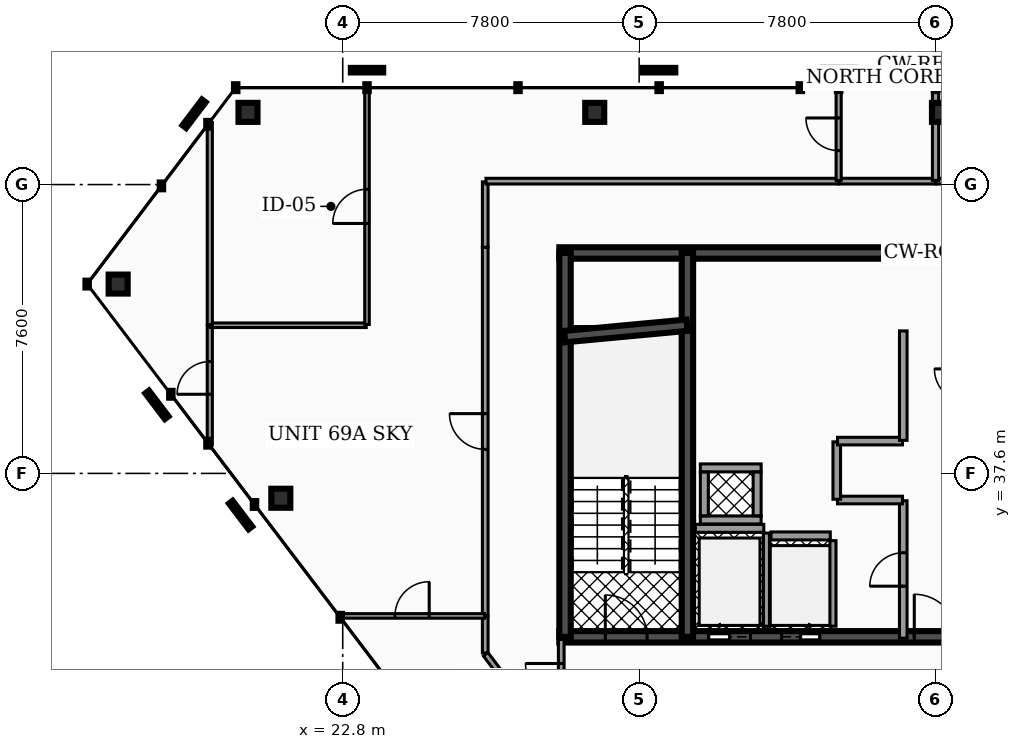
"""IFC4 building model, lengths in metres.
Left out: names, types, materials, properties, quantities, classifications, styles, units other than length and angle.
Written with IfcOpenShell. Run it as: python <this file> out.ifc"""

import sys

from ifc_helpers import new_model, si_unit, direction, frame, frame_2d, origin, origin_2d, place, context, subcontext, project, spatial, rectangle, hollow_rectangle, extrude, element, fill, save


model = new_model("IFC4")
c1 = context("Model", 3, precision=1e-05, world=origin(), true_north=direction((0.0, 1.0)))
c2 = subcontext(c1, "Body", "Model", "MODEL_VIEW")
j1 = project(units=[si_unit("LENGTHUNIT", "METRE"), si_unit("PLANEANGLEUNIT", "RADIAN")], contexts=[c1])
p1 = place(None, origin())
s1 = spatial("IfcSite", under=j1, at=p1, CompositionType="ELEMENT")
p2 = place(p1, origin())
s2 = spatial("IfcBuilding", under=s1, at=p2, CompositionType="ELEMENT")
p3 = place(p2, frame((0.0, 0.0, 272.0)))
s3 = spatial("IfcBuildingStorey", under=s2, at=p3, CompositionType="ELEMENT", Elevation=272.0)
p4 = place(p3, frame((28.5, 43.4, 0.0), z_axis=(0.0, 0.0, 1.0), x_axis=(1.0, 0.0, 0.0)))
e1 = element("IfcWall", 1, at=p4, inside=s3, PredefinedType="SHEAR", context=c2, shape_type="SweptSolid", body=[
    extrude(rectangle(XDim=19.86, YDim=0.3, at=frame_2d((9.93, 0.0))), origin(), (0.0, 0.0, 1.0), 3.18),
])
p5 = place(p3, frame((28.5, 33.3, 0.0), z_axis=(0.0, 0.0, 1.0), x_axis=(1.0, 0.0, 0.0)))
e2 = element("IfcWall", 2, at=p5, inside=s3, PredefinedType="SHEAR", context=c2, shape_type="SweptSolid", body=[
    extrude(rectangle(XDim=19.86, YDim=0.3, at=frame_2d((9.93, 0.0))), origin(), (0.0, 0.0, 1.0), 3.18),
])
p6 = place(p5, frame((3.93, 0.0, 0.0)))
e3 = element("IfcOpeningElement", 3, at=p6, cuts=e2, PredefinedType="OPENING", context=c2, shape_type="SweptSolid", body=[
    extrude(rectangle(XDim=1.1, YDim=2.15, at=frame_2d((0.55, 1.075))), frame((0.0, 0.16, 0.0), z_axis=(0.0, -1.0, 0.0), x_axis=(1.0, 0.0, 0.0)), (0.0, 0.0, 1.0), 0.32),
])
p7 = place(p5, frame((14.77, 0.0, 0.0)))
e4 = element("IfcOpeningElement", 4, at=p7, cuts=e2, PredefinedType="OPENING", context=c2, shape_type="SweptSolid", body=[
    extrude(rectangle(XDim=1.1, YDim=2.15, at=frame_2d((0.55, 1.075))), frame((0.0, 0.16, 0.0), z_axis=(0.0, -1.0, 0.0), x_axis=(1.0, 0.0, 0.0)), (0.0, 0.0, 1.0), 0.32),
])
p8 = place(p5, frame((11.25, 0.0, 0.0)))
e5 = element("IfcOpeningElement", 5, at=p8, cuts=e2, PredefinedType="OPENING", context=c2, shape_type="SweptSolid", body=[
    extrude(rectangle(XDim=1.0, YDim=2.1, at=frame_2d((0.5, 1.05))), frame((0.0, 0.16, 0.0), z_axis=(0.0, -1.0, 0.0), x_axis=(1.0, 0.0, 0.0)), (0.0, 0.0, 1.0), 0.32),
])
p9 = place(p5, frame((12.95, 0.0, 0.0)))
e6 = element("IfcOpeningElement", 6, at=p9, cuts=e2, PredefinedType="OPENING", context=c2, shape_type="SweptSolid", body=[
    extrude(rectangle(XDim=1.0, YDim=2.1, at=frame_2d((0.5, 1.05))), frame((0.0, 0.16, 0.0), z_axis=(0.0, -1.0, 0.0), x_axis=(1.0, 0.0, 0.0)), (0.0, 0.0, 1.0), 0.32),
])
p10 = place(p5, frame((5.85, 0.0, 0.0)))
e7 = element("IfcOpeningElement", 7, at=p10, cuts=e2, PredefinedType="OPENING", context=c2, shape_type="SweptSolid", body=[
    extrude(rectangle(XDim=1.0, YDim=2.1, at=frame_2d((0.5, 1.05))), frame((0.0, 0.16, 0.0), z_axis=(0.0, -1.0, 0.0), x_axis=(1.0, 0.0, 0.0)), (0.0, 0.0, 1.0), 0.32),
])
p11 = place(p5, frame((1.21, 0.0, 0.0)))
e8 = element("IfcOpeningElement", 8, at=p11, cuts=e2, PredefinedType="OPENING", context=c2, shape_type="SweptSolid", body=[
    extrude(rectangle(XDim=1.1, YDim=2.2, at=frame_2d((0.55, 1.1))), frame((0.0, 0.16, 0.0), z_axis=(0.0, -1.0, 0.0), x_axis=(1.0, 0.0, 0.0)), (0.0, 0.0, 1.0), 0.32),
])
p12 = place(p5, frame((9.34, 0.0, 0.0)))
e9 = element("IfcOpeningElement", 9, at=p12, cuts=e2, PredefinedType="OPENING", context=c2, shape_type="SweptSolid", body=[
    extrude(rectangle(XDim=1.12, YDim=2.05, at=frame_2d((0.56, 1.025))), frame((0.0, 0.16, 0.0), z_axis=(0.0, -1.0, 0.0), x_axis=(1.0, 0.0, 0.0)), (0.0, 0.0, 1.0), 0.32),
])
p13 = place(p5, frame((17.55, 0.0, 0.0)))
e10 = element("IfcOpeningElement", 10, at=p13, cuts=e2, PredefinedType="OPENING", context=c2, shape_type="SweptSolid", body=[
    extrude(rectangle(XDim=1.1, YDim=2.2, at=frame_2d((0.55, 1.1))), frame((0.0, 0.16, 0.0), z_axis=(0.0, -1.0, 0.0), x_axis=(1.0, 0.0, 0.0)), (0.0, 0.0, 1.0), 0.32),
])
for number, where, z_axis, x_axis in (
    (11, (28.65, 33.3, 0.0), (0.0, 0.0, 1.0), (0.0, 1.0, 0.0)),
    (12, (31.87, 33.3, 0.0), (0.0, 0.0, 1.0), (0.0, 1.0, 0.0)),
):
    element("IfcWall", number, at=place(p3, frame(where, z_axis=z_axis, x_axis=x_axis)), inside=s3, PredefinedType="SHEAR", context=c2, shape_type="SweptSolid", body=[
        extrude(rectangle(XDim=10.1, YDim=0.3, at=frame_2d((5.05, 0.0))), origin(), (0.0, 0.0, 1.0), 3.18),
    ])
p14 = place(p3, frame((28.64, 41.2, 0.0), z_axis=(0.0, 0.0, 1.0), x_axis=(0.995687118776, 0.092774789157, 0.0)))
e13 = element("IfcWall", 13, at=p14, inside=s3, PredefinedType="SHEAR", context=c2, shape_type="SweptSolid", body=[
    extrude(rectangle(XDim=3.234, YDim=0.3, at=frame_2d((1.617, 0.0))), origin(), (0.0, 0.0, 1.0), 3.18),
])
for number, where, z_axis, x_axis in (
    (14, (38.555, 47.1, 0.0), (0.0, 0.0, 1.0), (1.0, 0.0, 0.0)),
    (15, (29.431, 47.1, 0.0), (0.0, 0.0, 1.0), (1.0, 0.0, 0.0)),
    (16, (20.307, 47.1, 0.0), (0.0, 0.0, 1.0), (1.0, 0.0, 0.0)),
    (17, (16.891, 42.582, 0.0), (0.0, 0.0, 1.0), (1.0, 0.0, 0.0)),
    (18, (21.171, 36.946, 0.0), (0.0, 0.0, 1.0), (1.0, 0.0, 0.0)),
):
    element("IfcColumn", number, at=place(p3, frame(where, z_axis=z_axis, x_axis=x_axis)), inside=s3, PredefinedType="COLUMN", context=c2, shape_type="SweptSolid", body=[
        extrude(hollow_rectangle(XDim=0.5, YDim=0.5, WallThickness=0.025, at=origin_2d()), origin(), (0.0, 0.0, 1.0), 3.18),
    ])
p15 = place(p3, frame((32.08, 36.155, 0.0), z_axis=(0.0, 0.0, 1.0), x_axis=(1.0, 0.0, 0.0)))
e19 = element("IfcWall", 19, at=p15, inside=s3, PredefinedType="SOLIDWALL", context=c2, shape_type="SweptSolid", body=[
    extrude(rectangle(XDim=1.8, YDim=0.21, at=frame_2d((0.9, 0.0))), origin(), (0.0, 0.0, 1.0), 3.18),
])
p16 = place(p3, frame((33.95, 33.58, 0.0), z_axis=(0.0, 0.0, 1.0), x_axis=(0.0, 1.0, 0.0)))
e20 = element("IfcWall", 20, at=p16, inside=s3, PredefinedType="SOLIDWALL", context=c2, shape_type="SweptSolid", body=[
    extrude(rectangle(XDim=2.45, YDim=0.16, at=frame_2d((1.225, 0.0))), origin(), (0.0, 0.0, 1.0), 3.18),
])
p17 = place(p3, frame((34.07, 35.955, 0.0), z_axis=(0.0, 0.0, 1.0), x_axis=(1.0, 0.0, 0.0)))
e21 = element("IfcWall", 21, at=p17, inside=s3, PredefinedType="SOLIDWALL", context=c2, shape_type="SweptSolid", body=[
    extrude(rectangle(XDim=1.56, YDim=0.21, at=frame_2d((0.78, 0.0))), origin(), (0.0, 0.0, 1.0), 3.18),
])
p18 = place(p3, frame((35.7, 33.58, 0.0), z_axis=(0.0, 0.0, 1.0), x_axis=(0.0, 1.0, 0.0)))
e22 = element("IfcWall", 22, at=p18, inside=s3, PredefinedType="SOLIDWALL", context=c2, shape_type="SweptSolid", body=[
    extrude(rectangle(XDim=2.25, YDim=0.16, at=frame_2d((1.125, 0.0))), origin(), (0.0, 0.0, 1.0), 3.18),
])
for number, where, z_axis, x_axis in (
    (23, (32.21, 36.375, 0.0), (0.0, 0.0, 1.0), (1.0, 0.0, 0.0)),
    (24, (32.21, 37.745, 0.0), (0.0, 0.0, 1.0), (1.0, 0.0, 0.0)),
):
    element("IfcWall", number, at=place(p3, frame(where, z_axis=z_axis, x_axis=x_axis)), inside=s3, PredefinedType="SOLIDWALL", context=c2, shape_type="SweptSolid", body=[
        extrude(rectangle(XDim=1.6, YDim=0.21, at=frame_2d((0.8, 0.0))), origin(), (0.0, 0.0, 1.0), 3.18),
    ])
for number, where, z_axis, x_axis in (
    (25, (32.315, 36.485, 0.0), (0.0, 0.0, 1.0), (0.0, 1.0, 0.0)),
    (26, (33.705, 36.485, 0.0), (0.0, 0.0, 1.0), (0.0, 1.0, 0.0)),
):
    element("IfcWall", number, at=place(p3, frame(where, z_axis=z_axis, x_axis=x_axis)), inside=s3, PredefinedType="SOLIDWALL", context=c2, shape_type="SweptSolid", body=[
        extrude(rectangle(XDim=1.15, YDim=0.21, at=frame_2d((0.575, 0.0))), origin(), (0.0, 0.0, 1.0), 3.18),
    ])
p19 = place(p3, frame((37.55, 33.265, 0.0), z_axis=(0.0, 0.0, 1.0), x_axis=(0.0, 1.0, 0.0)))
e27 = element("IfcWall", 27, at=p19, inside=s3, PredefinedType="PARTITIONING", context=c2, shape_type="SweptSolid", body=[
    extrude(rectangle(XDim=3.615, YDim=0.2, at=frame_2d((1.808, 0.0))), origin(), (0.0, 0.0, 1.0), 2.235),
])
p20 = place(p19, frame((1.367, 0.0, 0.0)))
e28 = element("IfcOpeningElement", 28, at=p20, cuts=e27, PredefinedType="OPENING", context=c2, shape_type="SweptSolid", body=[
    extrude(rectangle(XDim=0.88, YDim=2.05, at=frame_2d((0.44, 1.025))), frame((0.0, 0.11, 0.0), z_axis=(0.0, -1.0, 0.0), x_axis=(1.0, 0.0, 0.0)), (0.0, 0.0, 1.0), 0.22),
])
p21 = place(p3, frame((35.82, 36.9, 0.0), z_axis=(0.0, 0.0, 1.0), x_axis=(1.0, 0.0, 0.0)))
e29 = element("IfcWall", 29, at=p21, inside=s3, PredefinedType="PARTITIONING", context=c2, shape_type="SweptSolid", body=[
    extrude(rectangle(XDim=1.71, YDim=0.2, at=frame_2d((0.855, 0.0))), origin(), (0.0, 0.0, 1.0), 2.235),
])
p22 = place(p3, frame((35.8, 36.92, 0.0), z_axis=(0.0, 0.0, 1.0), x_axis=(0.0, 1.0, 0.0)))
e30 = element("IfcWall", 30, at=p22, inside=s3, PredefinedType="PARTITIONING", context=c2, shape_type="SweptSolid", body=[
    extrude(rectangle(XDim=1.51, YDim=0.2, at=frame_2d((0.755, 0.0))), origin(), (0.0, 0.0, 1.0), 2.235),
])
p23 = place(p3, frame((35.82, 38.45, 0.0), z_axis=(0.0, 0.0, 1.0), x_axis=(1.0, 0.0, 0.0)))
e31 = element("IfcWall", 31, at=p23, inside=s3, PredefinedType="PARTITIONING", context=c2, shape_type="SweptSolid", body=[
    extrude(rectangle(XDim=1.71, YDim=0.2, at=frame_2d((0.855, 0.0))), origin(), (0.0, 0.0, 1.0), 2.235),
])
p24 = place(p3, frame((37.55, 38.47, 0.0), z_axis=(0.0, 0.0, 1.0), x_axis=(0.0, 1.0, 0.0)))
e32 = element("IfcWall", 32, at=p24, inside=s3, PredefinedType="PARTITIONING", context=c2, shape_type="SweptSolid", body=[
    extrude(rectangle(XDim=2.88, YDim=0.2, at=frame_2d((1.44, 0.0))), origin(), (0.0, 0.0, 1.0), 2.235),
])
p25 = place(p3, frame((28.55, 30.227, 0.0), z_axis=(0.0, 0.0, 1.0), x_axis=(0.0, 1.0, 0.0)))
e33 = element("IfcWall", 33, at=p25, inside=s3, PredefinedType="PARTITIONING", context=c2, shape_type="SweptSolid", body=[
    extrude(rectangle(XDim=3.003, YDim=0.15, at=frame_2d((1.501, 0.0))), origin(), (0.0, 0.0, 1.0), 2.235),
])
p26 = place(p25, frame((1.431, 0.0, 0.0)))
e34 = element("IfcOpeningElement", 34, at=p26, cuts=e33, PredefinedType="OPENING", context=c2, shape_type="SweptSolid", body=[
    extrude(rectangle(XDim=0.94, YDim=2.05, at=frame_2d((0.47, 1.025))), frame((0.0, 0.085, 0.0), z_axis=(0.0, -1.0, 0.0), x_axis=(1.0, 0.0, 0.0)), (0.0, 0.0, 1.0), 0.17),
])
p27 = place(p3, frame((26.55, 33.855, 0.0), z_axis=(0.0, 0.0, 1.0), x_axis=(0.0, 1.0, 0.0)))
e35 = element("IfcWall", 35, at=p27, inside=s3, PredefinedType="PARTITIONING", context=c2, shape_type="SweptSolid", body=[
    extrude(rectangle(XDim=9.695, YDim=0.15, at=frame_2d((4.847, 0.0))), origin(), (0.0, 0.0, 1.0), 2.235),
])
p28 = place(p27, frame((4.377, 0.0, 0.0)))
e36 = element("IfcOpeningElement", 36, at=p28, cuts=e35, PredefinedType="OPENING", context=c2, shape_type="SweptSolid", body=[
    extrude(rectangle(XDim=0.94, YDim=2.05, at=frame_2d((0.47, 1.025))), frame((0.0, 0.085, 0.0), z_axis=(0.0, -1.0, 0.0), x_axis=(1.0, 0.0, 0.0)), (0.0, 0.0, 1.0), 0.17),
])
p29 = place(p3, frame((26.55, 43.55, 0.0), z_axis=(0.0, 0.0, 1.0), x_axis=(0.0, 1.0, 0.0)))
e37 = element("IfcWall", 37, at=p29, inside=s3, PredefinedType="PARTITIONING", context=c2, shape_type="SweptSolid", body=[
    extrude(rectangle(XDim=1.72, YDim=0.15, at=frame_2d((0.86, 0.0))), origin(), (0.0, 0.0, 1.0), 2.235),
])
p30 = place(p3, frame((26.57, 45.29, 0.0), z_axis=(0.0, 0.0, 1.0), x_axis=(1.0, 0.0, 0.0)))
e38 = element("IfcWall", 38, at=p30, inside=s3, PredefinedType="PARTITIONING", context=c2, shape_type="SweptSolid", body=[
    extrude(rectangle(XDim=9.275, YDim=0.15, at=frame_2d((4.637, 0.0))), origin(), (0.0, 0.0, 1.0), 2.235),
])
p31 = place(p3, frame((35.855, 45.29, 0.0), z_axis=(0.0, 0.0, 1.0), x_axis=(1.0, 0.0, 0.0)))
e39 = element("IfcWall", 39, at=p31, inside=s3, PredefinedType="PARTITIONING", context=c2, shape_type="SweptSolid", body=[
    extrude(rectangle(XDim=2.54, YDim=0.15, at=frame_2d((1.27, 0.0))), origin(), (0.0, 0.0, 1.0), 2.235),
])
p32 = place(p3, frame((26.562, 32.84, 0.0), z_axis=(0.0, 0.0, 1.0), x_axis=(0.604783852999, -0.796389660375, 0.0)))
e40 = element("IfcWall", 40, at=p32, inside=s3, PredefinedType="PARTITIONING", context=c2, shape_type="SweptSolid", body=[
    extrude(rectangle(XDim=3.267, YDim=0.15, at=frame_2d((1.634, 0.0))), origin(), (0.0, 0.0, 1.0), 2.235),
])
p33 = place(p3, frame((26.55, 32.875, 0.0), z_axis=(0.0, 0.0, 1.0), x_axis=(0.0, 1.0, 0.0)))
e41 = element("IfcWall", 41, at=p33, inside=s3, PredefinedType="PARTITIONING", context=c2, shape_type="SweptSolid", body=[
    extrude(rectangle(XDim=0.97, YDim=0.15, at=frame_2d((0.485, 0.0))), origin(), (0.0, 0.0, 1.0), 2.235),
])
p34 = place(p3, frame((38.405, 45.29, 0.0), z_axis=(0.0, 0.0, 1.0), x_axis=(1.0, 0.0, 0.0)))
e42 = element("IfcWall", 42, at=p34, inside=s3, PredefinedType="PARTITIONING", context=c2, shape_type="SweptSolid", body=[
    extrude(rectangle(XDim=2.54, YDim=0.15, at=frame_2d((1.27, 0.0))), origin(), (0.0, 0.0, 1.0), 2.235),
])
p35 = place(p3, frame((19.302, 38.347, 0.0), z_axis=(0.0, 0.0, 1.0), x_axis=(0.0, 1.0, 0.0)))
e43 = element("IfcWall", 43, at=p35, inside=s3, PredefinedType="PARTITIONING", context=c2, shape_type="SweptSolid", body=[
    extrude(rectangle(XDim=3.132, YDim=0.135, at=frame_2d((1.566, 0.0))), origin(), (0.0, 0.0, 1.0), 2.235),
])
p36 = place(p35, frame((1.336, 0.0, 0.0)))
e44 = element("IfcOpeningElement", 44, at=p36, cuts=e43, PredefinedType="OPENING", context=c2, shape_type="SweptSolid", body=[
    extrude(rectangle(XDim=0.86, YDim=2.05, at=frame_2d((0.43, 1.025))), frame((0.0, 0.077, 0.0), z_axis=(0.0, -1.0, 0.0), x_axis=(1.0, 0.0, 0.0)), (0.0, 0.0, 1.0), 0.155),
])
p37 = place(p3, frame((35.85, 45.31, 0.0), z_axis=(0.0, 0.0, 1.0), x_axis=(0.0, 1.0, 0.0)))
e45 = element("IfcWall", 45, at=p37, inside=s3, PredefinedType="PARTITIONING", context=c2, shape_type="SweptSolid", body=[
    extrude(rectangle(XDim=2.425, YDim=0.135, at=frame_2d((1.212, 0.0))), origin(), (0.0, 0.0, 1.0), 2.235),
])
p38 = place(p37, frame((0.782, 0.0, 0.0)))
e46 = element("IfcOpeningElement", 46, at=p38, cuts=e45, PredefinedType="OPENING", context=c2, shape_type="SweptSolid", body=[
    extrude(rectangle(XDim=0.86, YDim=2.05, at=frame_2d((0.43, 1.025))), frame((0.0, 0.077, 0.0), z_axis=(0.0, -1.0, 0.0), x_axis=(1.0, 0.0, 0.0)), (0.0, 0.0, 1.0), 0.155),
])
p39 = place(p3, frame((19.322, 41.499, 0.0), z_axis=(0.0, 0.0, 1.0), x_axis=(1.0, 0.0, 0.0)))
e47 = element("IfcWall", 47, at=p39, inside=s3, PredefinedType="PARTITIONING", context=c2, shape_type="SweptSolid", body=[
    extrude(rectangle(XDim=4.097, YDim=0.12, at=frame_2d((2.048, 0.0))), origin(), (0.0, 0.0, 1.0), 2.235),
])
p40 = place(p3, frame((23.439, 41.519, 0.0), z_axis=(0.0, 0.0, 1.0), x_axis=(0.0, 1.0, 0.0)))
e48 = element("IfcWall", 48, at=p40, inside=s3, PredefinedType="PARTITIONING", context=c2, shape_type="SweptSolid", body=[
    extrude(rectangle(XDim=6.217, YDim=0.12, at=frame_2d((3.108, 0.0))), origin(), (0.0, 0.0, 1.0), 2.235),
])
p41 = place(p40, frame((2.658, 0.0, 0.0)))
e49 = element("IfcOpeningElement", 49, at=p41, cuts=e48, PredefinedType="OPENING", context=c2, shape_type="SweptSolid", body=[
    extrude(rectangle(XDim=0.9, YDim=2.05, at=frame_2d((0.45, 1.025))), frame((0.0, 0.07, 0.0), z_axis=(0.0, -1.0, 0.0), x_axis=(1.0, 0.0, 0.0)), (0.0, 0.0, 1.0), 0.14),
])
p42 = place(p3, frame((22.721, 33.85, 0.0), z_axis=(0.0, 0.0, 1.0), x_axis=(1.0, 0.0, 0.0)))
e50 = element("IfcWall", 50, at=p42, inside=s3, PredefinedType="PARTITIONING", context=c2, shape_type="SweptSolid", body=[
    extrude(rectangle(XDim=3.809, YDim=0.12, at=frame_2d((1.905, 0.0))), origin(), (0.0, 0.0, 1.0), 2.235),
])
p43 = place(p42, frame((1.455, 0.0, 0.0)))
e51 = element("IfcOpeningElement", 51, at=p43, cuts=e50, PredefinedType="OPENING", context=c2, shape_type="SweptSolid", body=[
    extrude(rectangle(XDim=0.9, YDim=2.05, at=frame_2d((0.45, 1.025))), frame((0.0, 0.07, 0.0), z_axis=(0.0, -1.0, 0.0), x_axis=(1.0, 0.0, 0.0)), (0.0, 0.0, 1.0), 0.14),
])
p44 = place(p3, frame((19.302, 41.519, 0.0), z_axis=(0.0, 0.0, 1.0), x_axis=(0.0, 1.0, 0.0)))
e52 = element("IfcWall", 52, at=p44, inside=s3, PredefinedType="PARTITIONING", context=c2, shape_type="SweptSolid", body=[
    extrude(rectangle(XDim=5.315, YDim=0.135, at=frame_2d((2.658, 0.0))), origin(), (0.0, 0.0, 1.0), 2.235),
])
p45 = place(p3, frame((38.4, 45.31, 0.0), z_axis=(0.0, 0.0, 1.0), x_axis=(0.0, 1.0, 0.0)))
e53 = element("IfcWall", 53, at=p45, inside=s3, PredefinedType="PARTITIONING", context=c2, shape_type="SweptSolid", body=[
    extrude(rectangle(XDim=2.425, YDim=0.165, at=frame_2d((1.212, 0.0))), origin(), (0.0, 0.0, 1.0), 2.235),
])
p46 = place(p6, origin())
e54 = element("IfcDoor", 54, at=p46, inside=s3, OperationType="SLIDING_TO_LEFT", PredefinedType="DOOR", context=c2, shape_type="SweptSolid", body=[
    extrude(rectangle(XDim=1.1, YDim=2.15, at=frame_2d((0.55, 1.075))), frame((0.0, 0.025, 0.0), z_axis=(0.0, -1.0, 0.0), x_axis=(1.0, 0.0, 0.0)), (0.0, 0.0, 1.0), 0.05),
])
fill(e3, e54)
p47 = place(p10, origin())
e55 = element("IfcDoor", 55, at=p47, inside=s3, OperationType="SLIDING_TO_RIGHT", PredefinedType="DOOR", context=c2, shape_type="SweptSolid", body=[
    extrude(rectangle(XDim=1.0, YDim=2.1, at=frame_2d((0.5, 1.05))), frame((0.0, 0.025, 0.0), z_axis=(0.0, -1.0, 0.0), x_axis=(1.0, 0.0, 0.0)), (0.0, 0.0, 1.0), 0.05),
])
fill(e7, e55)
p48 = place(p11, origin())
e56 = element("IfcDoor", 56, at=p48, inside=s3, OperationType="SINGLE_SWING_LEFT", PredefinedType="DOOR", context=c2, shape_type="SweptSolid", body=[
    extrude(rectangle(XDim=1.1, YDim=2.2, at=frame_2d((0.55, 1.1))), frame((0.0, 0.025, 0.0), z_axis=(0.0, -1.0, 0.0), x_axis=(1.0, 0.0, 0.0)), (0.0, 0.0, 1.0), 0.05),
])
fill(e8, e56)
p49 = place(p12, origin())
e57 = element("IfcDoor", 57, at=p49, inside=s3, OperationType="SINGLE_SWING_LEFT", PredefinedType="DOOR", context=c2, shape_type="SweptSolid", body=[
    extrude(rectangle(XDim=1.12, YDim=2.05, at=frame_2d((0.56, 1.025))), frame((0.0, 0.025, 0.0), z_axis=(0.0, -1.0, 0.0), x_axis=(1.0, 0.0, 0.0)), (0.0, 0.0, 1.0), 0.05),
])
fill(e9, e57)
p50 = place(p20, origin())
e58 = element("IfcDoor", 58, at=p50, inside=s3, OperationType="SINGLE_SWING_LEFT", PredefinedType="DOOR", context=c2, shape_type="SweptSolid", body=[
    extrude(rectangle(XDim=0.88, YDim=2.05, at=frame_2d((0.44, 1.025))), frame((0.0, 0.025, 0.0), z_axis=(0.0, -1.0, 0.0), x_axis=(1.0, 0.0, 0.0)), (0.0, 0.0, 1.0), 0.05),
])
fill(e28, e58)
p51 = place(p26, origin())
e59 = element("IfcDoor", 59, at=p51, inside=s3, OperationType="SINGLE_SWING_RIGHT", PredefinedType="DOOR", context=c2, shape_type="SweptSolid", body=[
    extrude(rectangle(XDim=0.94, YDim=2.05, at=frame_2d((0.47, 1.025))), frame((0.0, 0.025, 0.0), z_axis=(0.0, -1.0, 0.0), x_axis=(1.0, 0.0, 0.0)), (0.0, 0.0, 1.0), 0.05),
])
fill(e34, e59)
p52 = place(p28, origin())
e60 = element("IfcDoor", 60, at=p52, inside=s3, OperationType="SINGLE_SWING_RIGHT", PredefinedType="DOOR", context=c2, shape_type="SweptSolid", body=[
    extrude(rectangle(XDim=0.94, YDim=2.05, at=frame_2d((0.47, 1.025))), frame((0.0, 0.025, 0.0), z_axis=(0.0, -1.0, 0.0), x_axis=(1.0, 0.0, 0.0)), (0.0, 0.0, 1.0), 0.05),
])
fill(e36, e60)
p53 = place(p36, origin())
e61 = element("IfcDoor", 61, at=p53, inside=s3, OperationType="SINGLE_SWING_LEFT", PredefinedType="DOOR", context=c2, shape_type="SweptSolid", body=[
    extrude(rectangle(XDim=0.86, YDim=2.05, at=frame_2d((0.43, 1.025))), frame((0.0, 0.025, 0.0), z_axis=(0.0, -1.0, 0.0), x_axis=(1.0, 0.0, 0.0)), (0.0, 0.0, 1.0), 0.05),
])
fill(e44, e61)
p54 = place(p38, origin())
e62 = element("IfcDoor", 62, at=p54, inside=s3, OperationType="SINGLE_SWING_RIGHT", PredefinedType="DOOR", context=c2, shape_type="SweptSolid", body=[
    extrude(rectangle(XDim=0.86, YDim=2.05, at=frame_2d((0.43, 1.025))), frame((0.0, 0.025, 0.0), z_axis=(0.0, -1.0, 0.0), x_axis=(1.0, 0.0, 0.0)), (0.0, 0.0, 1.0), 0.05),
])
fill(e46, e62)
p55 = place(p41, origin())
e63 = element("IfcDoor", 63, at=p55, inside=s3, OperationType="SINGLE_SWING_LEFT", PredefinedType="DOOR", context=c2, shape_type="SweptSolid", body=[
    extrude(rectangle(XDim=0.9, YDim=2.05, at=frame_2d((0.45, 1.025))), frame((0.0, 0.025, 0.0), z_axis=(0.0, -1.0, 0.0), x_axis=(1.0, 0.0, 0.0)), (0.0, 0.0, 1.0), 0.05),
])
fill(e49, e63)
p56 = place(p43, origin())
e64 = element("IfcDoor", 64, at=p56, inside=s3, OperationType="SINGLE_SWING_RIGHT", PredefinedType="DOOR", context=c2, shape_type="SweptSolid", body=[
    extrude(rectangle(XDim=0.9, YDim=2.05, at=frame_2d((0.45, 1.025))), frame((0.0, 0.025, 0.0), z_axis=(0.0, -1.0, 0.0), x_axis=(1.0, 0.0, 0.0)), (0.0, 0.0, 1.0), 0.05),
])
fill(e51, e64)
save(model, sys.argv[1])
